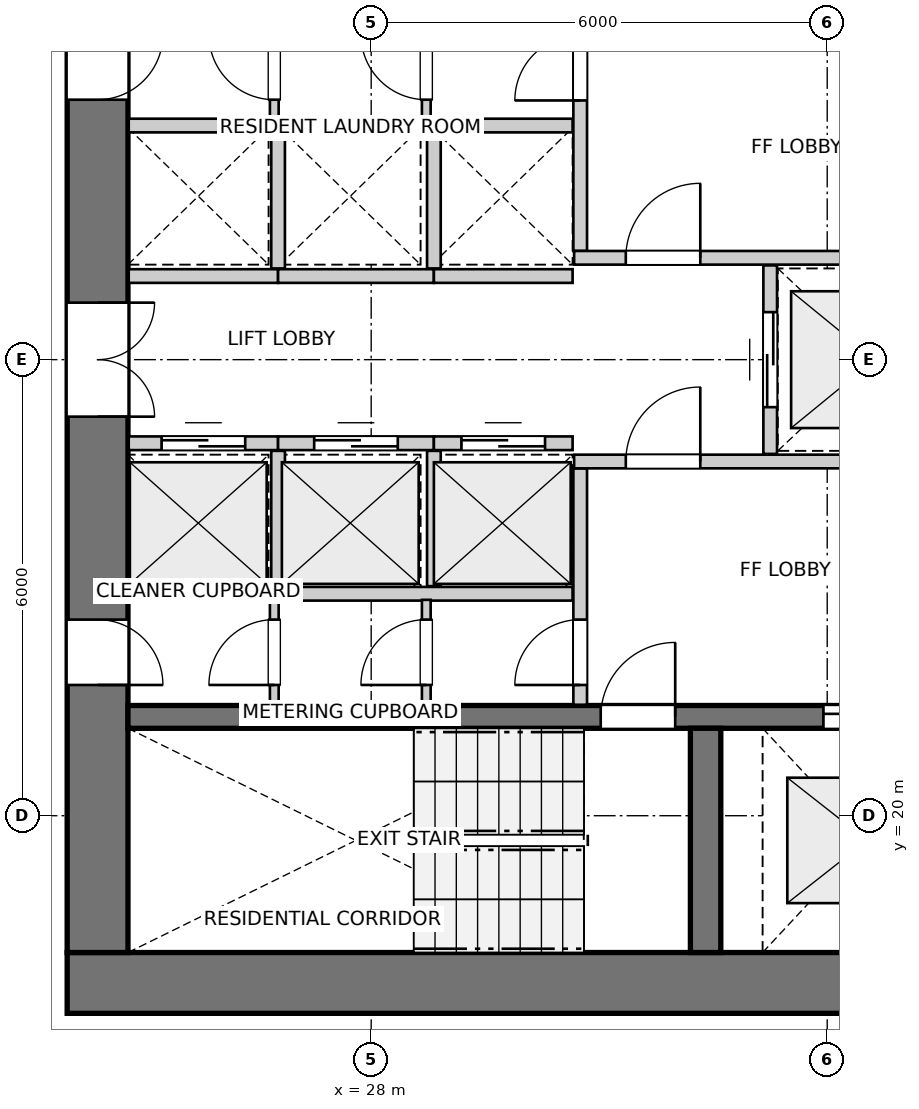
"""IFC4 building model, lengths in metres.
Left out: names, types, materials, properties, quantities, classifications, styles, units other than length and angle.
Written with IfcOpenShell. Run it as: python <this file> out.ifc"""

import sys

from ifc_helpers import new_model, si_unit, direction, frame, frame_2d, origin, place, context, subcontext, project, spatial, rectangle, extrude, source, transform, mapped, element, fill, save


model = new_model("IFC4")
c1 = context("Model", 3, precision=1e-05, world=origin(), true_north=direction((0.0, 1.0)))
c2 = subcontext(c1, "Body", "Model", "MODEL_VIEW")
j1 = project(units=[si_unit("LENGTHUNIT", "METRE"), si_unit("PLANEANGLEUNIT", "RADIAN")], contexts=[c1])
p1 = place(None, origin())
s1 = spatial("IfcSite", under=j1, at=p1, CompositionType="ELEMENT")
p2 = place(p1, origin())
s2 = spatial("IfcBuilding", under=s1, at=p2, CompositionType="ELEMENT")
p3 = place(p2, frame((0.0, 0.0, 55.8)))
s3 = spatial("IfcBuildingStorey", under=s2, at=p3, CompositionType="ELEMENT", Elevation=55.8)
p4 = place(p3, frame((24.0, 17.8, 0.0), z_axis=(0.0, 0.0, 1.0), x_axis=(1.0, 0.0, 0.0)))
e1 = element("IfcWall", 1, at=p4, inside=s3, PredefinedType="SHEAR", context=c2, shape_type="SweptSolid", body=[
    extrude(rectangle(XDim=12.7, YDim=0.8, at=frame_2d((6.35, 0.0))), origin(), (0.0, 0.0, 1.0), 2.94),
])
p5 = place(p3, frame((24.4, 33.8, 0.0), z_axis=(0.0, 0.0, 1.0), x_axis=(0.0, -1.0, 0.0)))
e2 = element("IfcWall", 2, at=p5, inside=s3, PredefinedType="SHEAR", context=c2, shape_type="SweptSolid", body=[
    extrude(rectangle(XDim=15.6, YDim=0.8, at=frame_2d((7.8, 0.0))), origin(), (0.0, 0.0, 1.0), 2.94),
])
p6 = place(p5, frame((7.05, 0.0, 0.0)))
e3 = element("IfcOpeningElement", 3, at=p6, cuts=e2, PredefinedType="OPENING", context=c2, shape_type="SweptSolid", body=[
    extrude(rectangle(XDim=1.5, YDim=2.15, at=frame_2d((0.75, 1.075))), frame((0.0, 0.41, 0.0), z_axis=(0.0, -1.0, 0.0), x_axis=(1.0, 0.0, 0.0)), (0.0, 0.0, 1.0), 0.82),
])
p7 = place(p5, frame((3.52, 0.0, 0.0)))
e4 = element("IfcOpeningElement", 4, at=p7, cuts=e2, PredefinedType="OPENING", context=c2, shape_type="SweptSolid", body=[
    extrude(rectangle(XDim=0.86, YDim=2.05, at=frame_2d((0.43, 1.025))), frame((0.0, 0.41, 0.0), z_axis=(0.0, -1.0, 0.0), x_axis=(1.0, 0.0, 0.0)), (0.0, 0.0, 1.0), 0.82),
])
p8 = place(p5, frame((11.22, 0.0, 0.0)))
e5 = element("IfcOpeningElement", 5, at=p8, cuts=e2, PredefinedType="OPENING", context=c2, shape_type="SweptSolid", body=[
    extrude(rectangle(XDim=0.86, YDim=2.05, at=frame_2d((0.43, 1.025))), frame((0.0, 0.41, 0.0), z_axis=(0.0, -1.0, 0.0), x_axis=(1.0, 0.0, 0.0)), (0.0, 0.0, 1.0), 0.82),
])
p9 = place(p3, frame((24.8, 21.3, 0.0), z_axis=(0.0, 0.0, 1.0), x_axis=(1.0, 0.0, 0.0)))
e6 = element("IfcWall", 6, at=p9, inside=s3, PredefinedType="SHEAR", context=c2, shape_type="SweptSolid", body=[
    extrude(rectangle(XDim=11.1, YDim=0.3, at=frame_2d((5.55, 0.0))), origin(), (0.0, 0.0, 1.0), 2.94),
])
p10 = place(p9, frame((6.22, 0.0, 0.0)))
e7 = element("IfcOpeningElement", 7, at=p10, cuts=e6, PredefinedType="OPENING", context=c2, shape_type="SweptSolid", body=[
    extrude(rectangle(XDim=0.98, YDim=2.15, at=frame_2d((0.49, 1.075))), frame((0.0, 0.16, 0.0), z_axis=(0.0, -1.0, 0.0), x_axis=(1.0, 0.0, 0.0)), (0.0, 0.0, 1.0), 0.32),
])
p11 = place(p9, frame((9.15, 0.0, 0.0)))
e8 = element("IfcOpeningElement", 8, at=p11, cuts=e6, PredefinedType="OPENING", context=c2, shape_type="SweptSolid", body=[
    extrude(rectangle(XDim=1.15, YDim=2.15, at=frame_2d((0.575, 1.075))), frame((0.0, 0.16, 0.0), z_axis=(0.0, -1.0, 0.0), x_axis=(1.0, 0.0, 0.0)), (0.0, 0.0, 1.0), 0.32),
])
p12 = place(p3, frame((32.4, 18.2, 0.0), z_axis=(0.0, 0.0, 1.0), x_axis=(0.0, 1.0, 0.0)))
e9 = element("IfcWall", 9, at=p12, inside=s3, PredefinedType="SHEAR", context=c2, shape_type="SweptSolid", body=[
    extrude(rectangle(XDim=2.95, YDim=0.4, at=frame_2d((1.475, 0.0))), origin(), (0.0, 0.0, 1.0), 2.94),
])
p13 = place(p3, frame((30.75, 21.46, 0.0), z_axis=(0.0, 0.0, 1.0), x_axis=(0.0, 1.0, 0.0)))
e10 = element("IfcWall", 10, at=p13, inside=s3, PredefinedType="PARTITIONING", context=c2, shape_type="SweptSolid", body=[
    extrude(rectangle(XDim=3.11, YDim=0.18, at=frame_2d((1.555, 0.0))), origin(), (0.0, 0.0, 1.0), 2.94),
])
p14 = place(p13, frame((0.26, 0.0, 0.0)))
e11 = element("IfcOpeningElement", 11, at=p14, cuts=e10, PredefinedType="OPENING", context=c2, shape_type="SweptSolid", body=[
    extrude(rectangle(XDim=0.86, YDim=2.05, at=frame_2d((0.43, 1.025))), frame((0.0, 0.1, 0.0), z_axis=(0.0, -1.0, 0.0), x_axis=(1.0, 0.0, 0.0)), (0.0, 0.0, 1.0), 0.2),
])
p15 = place(p3, frame((30.67, 24.66, 0.0), z_axis=(0.0, 0.0, 1.0), x_axis=(1.0, 0.0, 0.0)))
e12 = element("IfcWall", 12, at=p15, inside=s3, PredefinedType="PARTITIONING", context=c2, shape_type="SweptSolid", body=[
    extrude(rectangle(XDim=5.22, YDim=0.18, at=frame_2d((2.61, 0.0))), origin(), (0.0, 0.0, 1.0), 2.94),
])
p16 = place(p15, frame((0.68, 0.0, 0.0)))
e13 = element("IfcOpeningElement", 13, at=p16, cuts=e12, PredefinedType="OPENING", context=c2, shape_type="SweptSolid", body=[
    extrude(rectangle(XDim=0.98, YDim=2.15, at=frame_2d((0.49, 1.075))), frame((0.0, 0.1, 0.0), z_axis=(0.0, -1.0, 0.0), x_axis=(1.0, 0.0, 0.0)), (0.0, 0.0, 1.0), 0.2),
])
p17 = place(p3, frame((30.75, 27.43, 0.0), z_axis=(0.0, 0.0, 1.0), x_axis=(0.0, 1.0, 0.0)))
e14 = element("IfcWall", 14, at=p17, inside=s3, PredefinedType="PARTITIONING", context=c2, shape_type="SweptSolid", body=[
    extrude(rectangle(XDim=3.11, YDim=0.18, at=frame_2d((1.555, 0.0))), origin(), (0.0, 0.0, 1.0), 2.94),
])
p18 = place(p17, frame((1.98, 0.0, 0.0)))
e15 = element("IfcOpeningElement", 15, at=p18, cuts=e14, PredefinedType="OPENING", context=c2, shape_type="SweptSolid", body=[
    extrude(rectangle(XDim=0.86, YDim=2.05, at=frame_2d((0.43, 1.025))), frame((0.0, 0.1, 0.0), z_axis=(0.0, -1.0, 0.0), x_axis=(1.0, 0.0, 0.0)), (0.0, 0.0, 1.0), 0.2),
])
p19 = place(p3, frame((30.67, 27.34, 0.0), z_axis=(0.0, 0.0, 1.0), x_axis=(1.0, 0.0, 0.0)))
e16 = element("IfcWall", 16, at=p19, inside=s3, PredefinedType="PARTITIONING", context=c2, shape_type="SweptSolid", body=[
    extrude(rectangle(XDim=5.22, YDim=0.18, at=frame_2d((2.61, 0.0))), origin(), (0.0, 0.0, 1.0), 2.94),
])
p20 = place(p19, frame((0.68, 0.0, 0.0)))
e17 = element("IfcOpeningElement", 17, at=p20, cuts=e16, PredefinedType="OPENING", context=c2, shape_type="SweptSolid", body=[
    extrude(rectangle(XDim=0.98, YDim=2.15, at=frame_2d((0.49, 1.075))), frame((0.0, 0.1, 0.0), z_axis=(0.0, -1.0, 0.0), x_axis=(1.0, 0.0, 0.0)), (0.0, 0.0, 1.0), 0.2),
])
p21 = place(p3, frame((33.25, 24.76, 0.0), z_axis=(0.0, 0.0, 1.0), x_axis=(0.0, 1.0, 0.0)))
e18 = element("IfcWall", 18, at=p21, inside=s3, PredefinedType="PARTITIONING", context=c2, shape_type="SweptSolid", body=[
    extrude(rectangle(XDim=2.48, YDim=0.18, at=frame_2d((1.24, 0.0))), origin(), (0.0, 0.0, 1.0), 2.94),
])
p22 = place(p21, frame((0.615, 0.0, 0.0)))
e19 = element("IfcOpeningElement", 19, at=p22, cuts=e18, PredefinedType="OPENING", context=c2, shape_type="SweptSolid", body=[
    extrude(rectangle(XDim=1.25, YDim=2.15, at=frame_2d((0.625, 1.075))), frame((0.0, 0.1, 0.0), z_axis=(0.0, -1.0, 0.0), x_axis=(1.0, 0.0, 0.0)), (0.0, 0.0, 1.0), 0.2),
])
p23 = place(p3, frame((24.81, 22.92, 0.0), z_axis=(0.0, 0.0, 1.0), x_axis=(1.0, 0.0, 0.0)))
e20 = element("IfcWall", 20, at=p23, inside=s3, PredefinedType="PARTITIONING", context=c2, shape_type="SweptSolid", body=[
    extrude(rectangle(XDim=5.84, YDim=0.18, at=frame_2d((2.92, 0.0))), origin(), (0.0, 0.0, 1.0), 2.94),
])
p24 = place(p3, frame((24.81, 24.9, 0.0), z_axis=(0.0, 0.0, 1.0), x_axis=(1.0, 0.0, 0.0)))
e21 = element("IfcWall", 21, at=p24, inside=s3, PredefinedType="PARTITIONING", context=c2, shape_type="SweptSolid", body=[
    extrude(rectangle(XDim=1.965, YDim=0.18, at=frame_2d((0.982, 0.0))), origin(), (0.0, 0.0, 1.0), 2.94),
])
p25 = place(p24, frame((0.433, 0.0, 0.0)))
e22 = element("IfcOpeningElement", 22, at=p25, cuts=e21, PredefinedType="OPENING", context=c2, shape_type="SweptSolid", body=[
    extrude(rectangle(XDim=1.1, YDim=2.15, at=frame_2d((0.55, 1.075))), frame((0.0, 0.1, 0.0), z_axis=(0.0, -1.0, 0.0), x_axis=(1.0, 0.0, 0.0)), (0.0, 0.0, 1.0), 0.2),
])
p26 = place(p3, frame((26.775, 24.9, 0.0), z_axis=(0.0, 0.0, 1.0), x_axis=(1.0, 0.0, 0.0)))
e23 = element("IfcWall", 23, at=p26, inside=s3, PredefinedType="PARTITIONING", context=c2, shape_type="SweptSolid", body=[
    extrude(rectangle(XDim=2.05, YDim=0.18, at=frame_2d((1.025, 0.0))), origin(), (0.0, 0.0, 1.0), 2.94),
])
p27 = place(p26, frame((0.475, 0.0, 0.0)))
e24 = element("IfcOpeningElement", 24, at=p27, cuts=e23, PredefinedType="OPENING", context=c2, shape_type="SweptSolid", body=[
    extrude(rectangle(XDim=1.1, YDim=2.15, at=frame_2d((0.55, 1.075))), frame((0.0, 0.1, 0.0), z_axis=(0.0, -1.0, 0.0), x_axis=(1.0, 0.0, 0.0)), (0.0, 0.0, 1.0), 0.2),
])
p28 = place(p3, frame((26.775, 23.02, 0.0), z_axis=(0.0, 0.0, 1.0), x_axis=(0.0, 1.0, 0.0)))
e25 = element("IfcWall", 25, at=p28, inside=s3, PredefinedType="PARTITIONING", context=c2, shape_type="SweptSolid", body=[
    extrude(rectangle(XDim=1.78, YDim=0.18, at=frame_2d((0.89, 0.0))), origin(), (0.0, 0.0, 1.0), 2.94),
])
p29 = place(p3, frame((28.825, 24.9, 0.0), z_axis=(0.0, 0.0, 1.0), x_axis=(1.0, 0.0, 0.0)))
e26 = element("IfcWall", 26, at=p29, inside=s3, PredefinedType="PARTITIONING", context=c2, shape_type="SweptSolid", body=[
    extrude(rectangle(XDim=1.825, YDim=0.18, at=frame_2d((0.913, 0.0))), origin(), (0.0, 0.0, 1.0), 2.94),
])
p30 = place(p29, frame((0.363, 0.0, 0.0)))
e27 = element("IfcOpeningElement", 27, at=p30, cuts=e26, PredefinedType="OPENING", context=c2, shape_type="SweptSolid", body=[
    extrude(rectangle(XDim=1.1, YDim=2.15, at=frame_2d((0.55, 1.075))), frame((0.0, 0.1, 0.0), z_axis=(0.0, -1.0, 0.0), x_axis=(1.0, 0.0, 0.0)), (0.0, 0.0, 1.0), 0.2),
])
p31 = place(p3, frame((28.825, 23.02, 0.0), z_axis=(0.0, 0.0, 1.0), x_axis=(0.0, 1.0, 0.0)))
e28 = element("IfcWall", 28, at=p31, inside=s3, PredefinedType="PARTITIONING", context=c2, shape_type="SweptSolid", body=[
    extrude(rectangle(XDim=1.78, YDim=0.18, at=frame_2d((0.89, 0.0))), origin(), (0.0, 0.0, 1.0), 2.94),
])
p32 = place(p3, frame((24.81, 29.08, 0.0), z_axis=(0.0, 0.0, 1.0), x_axis=(1.0, 0.0, 0.0)))
e29 = element("IfcWall", 29, at=p32, inside=s3, PredefinedType="PARTITIONING", context=c2, shape_type="SweptSolid", body=[
    extrude(rectangle(XDim=5.84, YDim=0.18, at=frame_2d((2.92, 0.0))), origin(), (0.0, 0.0, 1.0), 2.94),
])
p33 = place(p3, frame((24.81, 27.1, 0.0), z_axis=(0.0, 0.0, 1.0), x_axis=(1.0, 0.0, 0.0)))
e30 = element("IfcWall", 30, at=p33, inside=s3, PredefinedType="PARTITIONING", context=c2, shape_type="SweptSolid", body=[
    extrude(rectangle(XDim=1.965, YDim=0.18, at=frame_2d((0.982, 0.0))), origin(), (0.0, 0.0, 1.0), 2.94),
])
p34 = place(p3, frame((26.775, 27.1, 0.0), z_axis=(0.0, 0.0, 1.0), x_axis=(1.0, 0.0, 0.0)))
e31 = element("IfcWall", 31, at=p34, inside=s3, PredefinedType="PARTITIONING", context=c2, shape_type="SweptSolid", body=[
    extrude(rectangle(XDim=2.05, YDim=0.18, at=frame_2d((1.025, 0.0))), origin(), (0.0, 0.0, 1.0), 2.94),
])
p35 = place(p3, frame((26.775, 27.2, 0.0), z_axis=(0.0, 0.0, 1.0), x_axis=(0.0, 1.0, 0.0)))
e32 = element("IfcWall", 32, at=p35, inside=s3, PredefinedType="PARTITIONING", context=c2, shape_type="SweptSolid", body=[
    extrude(rectangle(XDim=1.78, YDim=0.18, at=frame_2d((0.89, 0.0))), origin(), (0.0, 0.0, 1.0), 2.94),
])
p36 = place(p3, frame((28.825, 27.1, 0.0), z_axis=(0.0, 0.0, 1.0), x_axis=(1.0, 0.0, 0.0)))
e33 = element("IfcWall", 33, at=p36, inside=s3, PredefinedType="PARTITIONING", context=c2, shape_type="SweptSolid", body=[
    extrude(rectangle(XDim=1.825, YDim=0.18, at=frame_2d((0.913, 0.0))), origin(), (0.0, 0.0, 1.0), 2.94),
])
p37 = place(p3, frame((28.825, 27.2, 0.0), z_axis=(0.0, 0.0, 1.0), x_axis=(0.0, 1.0, 0.0)))
e34 = element("IfcWall", 34, at=p37, inside=s3, PredefinedType="PARTITIONING", context=c2, shape_type="SweptSolid", body=[
    extrude(rectangle(XDim=1.78, YDim=0.18, at=frame_2d((0.89, 0.0))), origin(), (0.0, 0.0, 1.0), 2.94),
])
p38 = place(p3, frame((26.725, 21.46, 0.0), z_axis=(0.0, 0.0, 1.0), x_axis=(0.0, 1.0, 0.0)))
e35 = element("IfcWall", 35, at=p38, inside=s3, PredefinedType="PARTITIONING", context=c2, shape_type="SweptSolid", body=[
    extrude(rectangle(XDim=1.38, YDim=0.115, at=frame_2d((0.69, 0.0))), origin(), (0.0, 0.0, 1.0), 2.94),
])
p39 = place(p38, frame((0.26, 0.0, 0.0)))
e36 = element("IfcOpeningElement", 36, at=p39, cuts=e35, PredefinedType="OPENING", context=c2, shape_type="SweptSolid", body=[
    extrude(rectangle(XDim=0.86, YDim=2.05, at=frame_2d((0.43, 1.025))), frame((0.0, 0.067, 0.0), z_axis=(0.0, -1.0, 0.0), x_axis=(1.0, 0.0, 0.0)), (0.0, 0.0, 1.0), 0.135),
])
p40 = place(p3, frame((26.725, 29.16, 0.0), z_axis=(0.0, 0.0, 1.0), x_axis=(0.0, 1.0, 0.0)))
e37 = element("IfcWall", 37, at=p40, inside=s3, PredefinedType="PARTITIONING", context=c2, shape_type="SweptSolid", body=[
    extrude(rectangle(XDim=1.38, YDim=0.115, at=frame_2d((0.69, 0.0))), origin(), (0.0, 0.0, 1.0), 2.94),
])
p41 = place(p40, frame((0.26, 0.0, 0.0)))
e38 = element("IfcOpeningElement", 38, at=p41, cuts=e37, PredefinedType="OPENING", context=c2, shape_type="SweptSolid", body=[
    extrude(rectangle(XDim=0.86, YDim=2.05, at=frame_2d((0.43, 1.025))), frame((0.0, 0.067, 0.0), z_axis=(0.0, -1.0, 0.0), x_axis=(1.0, 0.0, 0.0)), (0.0, 0.0, 1.0), 0.135),
])
p42 = place(p3, frame((28.725, 21.46, 0.0), z_axis=(0.0, 0.0, 1.0), x_axis=(0.0, 1.0, 0.0)))
e39 = element("IfcWall", 39, at=p42, inside=s3, PredefinedType="PARTITIONING", context=c2, shape_type="SweptSolid", body=[
    extrude(rectangle(XDim=1.38, YDim=0.115, at=frame_2d((0.69, 0.0))), origin(), (0.0, 0.0, 1.0), 2.94),
])
p43 = place(p42, frame((0.26, 0.0, 0.0)))
e40 = element("IfcOpeningElement", 40, at=p43, cuts=e39, PredefinedType="OPENING", context=c2, shape_type="SweptSolid", body=[
    extrude(rectangle(XDim=0.86, YDim=2.05, at=frame_2d((0.43, 1.025))), frame((0.0, 0.067, 0.0), z_axis=(0.0, -1.0, 0.0), x_axis=(1.0, 0.0, 0.0)), (0.0, 0.0, 1.0), 0.135),
])
p44 = place(p3, frame((28.725, 29.16, 0.0), z_axis=(0.0, 0.0, 1.0), x_axis=(0.0, 1.0, 0.0)))
e41 = element("IfcWall", 41, at=p44, inside=s3, PredefinedType="PARTITIONING", context=c2, shape_type="SweptSolid", body=[
    extrude(rectangle(XDim=1.38, YDim=0.115, at=frame_2d((0.69, 0.0))), origin(), (0.0, 0.0, 1.0), 2.94),
])
p45 = place(p44, frame((0.26, 0.0, 0.0)))
e42 = element("IfcOpeningElement", 42, at=p45, cuts=e41, PredefinedType="OPENING", context=c2, shape_type="SweptSolid", body=[
    extrude(rectangle(XDim=0.86, YDim=2.05, at=frame_2d((0.43, 1.025))), frame((0.0, 0.067, 0.0), z_axis=(0.0, -1.0, 0.0), x_axis=(1.0, 0.0, 0.0)), (0.0, 0.0, 1.0), 0.135),
])
m1 = source(origin(), c2, "Body", "SweptSolid", [
    extrude(rectangle(XDim=0.98, YDim=2.15, at=frame_2d((0.49, 1.075))), frame((0.0, 0.025, 0.0), z_axis=(0.0, -1.0, 0.0), x_axis=(1.0, 0.0, 0.0)), (0.0, 0.0, 1.0), 0.05),
])
p46 = place(p10, origin())
e43 = element("IfcDoor", 43, at=p46, inside=s3, OperationType="SINGLE_SWING_RIGHT", PredefinedType="DOOR", context=c2, shape_type="MappedRepresentation", body=[
    mapped(m1, transform((0.0, 0.0, 0.0), x_axis=(1.0, 0.0, 0.0), y_axis=(0.0, 1.0, 0.0), z_axis=(0.0, 0.0, 1.0), scale=1.0)),
])
fill(e7, e43)
m2 = source(origin(), c2, "Body", "SweptSolid", [
    extrude(rectangle(XDim=1.15, YDim=2.15, at=frame_2d((0.575, 1.075))), frame((0.0, 0.025, 0.0), z_axis=(0.0, -1.0, 0.0), x_axis=(1.0, 0.0, 0.0)), (0.0, 0.0, 1.0), 0.05),
])
p47 = place(p11, origin())
e44 = element("IfcDoor", 44, at=p47, inside=s3, OperationType="DOUBLE_DOOR_SLIDING", PredefinedType="DOOR", context=c2, shape_type="MappedRepresentation", body=[
    mapped(m2, transform((0.0, 0.0, 0.0), x_axis=(1.0, 0.0, 0.0), y_axis=(0.0, 1.0, 0.0), z_axis=(0.0, 0.0, 1.0), scale=1.0)),
])
fill(e8, e44)
m3 = source(origin(), c2, "Body", "SweptSolid", [
    extrude(rectangle(XDim=1.5, YDim=2.15, at=frame_2d((0.75, 1.075))), frame((0.0, 0.025, 0.0), z_axis=(0.0, -1.0, 0.0), x_axis=(1.0, 0.0, 0.0)), (0.0, 0.0, 1.0), 0.05),
])
p48 = place(p6, origin())
e45 = element("IfcDoor", 45, at=p48, inside=s3, OperationType="DOUBLE_DOOR_SINGLE_SWING", PredefinedType="DOOR", context=c2, shape_type="MappedRepresentation", body=[
    mapped(m3, transform((0.0, 0.0, 0.0), x_axis=(1.0, 0.0, 0.0), y_axis=(0.0, 1.0, 0.0), z_axis=(0.0, 0.0, 1.0), scale=1.0)),
])
fill(e3, e45)
m4 = source(origin(), c2, "Body", "SweptSolid", [
    extrude(rectangle(XDim=0.86, YDim=2.05, at=frame_2d((0.43, 1.025))), frame((0.0, 0.025, 0.0), z_axis=(0.0, -1.0, 0.0), x_axis=(1.0, 0.0, 0.0)), (0.0, 0.0, 1.0), 0.05),
])
p49 = place(p7, origin())
e46 = element("IfcDoor", 46, at=p49, inside=s3, OperationType="SINGLE_SWING_LEFT", PredefinedType="DOOR", context=c2, shape_type="MappedRepresentation", body=[
    mapped(m4, transform((0.0, 0.0, 0.0), x_axis=(1.0, 0.0, 0.0), y_axis=(0.0, 1.0, 0.0), z_axis=(0.0, 0.0, 1.0), scale=1.0)),
])
fill(e4, e46)
p50 = place(p8, origin())
e47 = element("IfcDoor", 47, at=p50, inside=s3, OperationType="SINGLE_SWING_RIGHT", PredefinedType="DOOR", context=c2, shape_type="MappedRepresentation", body=[
    mapped(m4, transform((0.0, 0.0, 0.0), x_axis=(1.0, 0.0, 0.0), y_axis=(0.0, 1.0, 0.0), z_axis=(0.0, 0.0, 1.0), scale=1.0)),
])
fill(e5, e47)
p51 = place(p14, origin())
e48 = element("IfcDoor", 48, at=p51, inside=s3, OperationType="SINGLE_SWING_LEFT", PredefinedType="DOOR", context=c2, shape_type="MappedRepresentation", body=[
    mapped(m4, transform((0.0, 0.0, 0.0), x_axis=(1.0, 0.0, 0.0), y_axis=(0.0, 1.0, 0.0), z_axis=(0.0, 0.0, 1.0), scale=1.0)),
])
fill(e11, e48)
p52 = place(p16, origin())
e49 = element("IfcDoor", 49, at=p52, inside=s3, OperationType="SINGLE_SWING_RIGHT", PredefinedType="DOOR", context=c2, shape_type="MappedRepresentation", body=[
    mapped(m1, transform((0.0, 0.0, 0.0), x_axis=(1.0, 0.0, 0.0), y_axis=(0.0, 1.0, 0.0), z_axis=(0.0, 0.0, 1.0), scale=1.0)),
])
fill(e13, e49)
p53 = place(p18, origin())
e50 = element("IfcDoor", 50, at=p53, inside=s3, OperationType="SINGLE_SWING_LEFT", PredefinedType="DOOR", context=c2, shape_type="MappedRepresentation", body=[
    mapped(m4, transform((0.0, 0.0, 0.0), x_axis=(1.0, 0.0, 0.0), y_axis=(0.0, 1.0, 0.0), z_axis=(0.0, 0.0, 1.0), scale=1.0)),
])
fill(e15, e50)
p54 = place(p20, origin())
e51 = element("IfcDoor", 51, at=p54, inside=s3, OperationType="SINGLE_SWING_RIGHT", PredefinedType="DOOR", context=c2, shape_type="MappedRepresentation", body=[
    mapped(m1, transform((0.0, 0.0, 0.0), x_axis=(1.0, 0.0, 0.0), y_axis=(0.0, 1.0, 0.0), z_axis=(0.0, 0.0, 1.0), scale=1.0)),
])
fill(e17, e51)
m5 = source(origin(), c2, "Body", "SweptSolid", [
    extrude(rectangle(XDim=1.25, YDim=2.15, at=frame_2d((0.625, 1.075))), frame((0.0, 0.025, 0.0), z_axis=(0.0, -1.0, 0.0), x_axis=(1.0, 0.0, 0.0)), (0.0, 0.0, 1.0), 0.05),
])
p55 = place(p22, origin())
e52 = element("IfcDoor", 52, at=p55, inside=s3, OperationType="DOUBLE_DOOR_SLIDING", PredefinedType="DOOR", context=c2, shape_type="MappedRepresentation", body=[
    mapped(m5, transform((0.0, 0.0, 0.0), x_axis=(1.0, 0.0, 0.0), y_axis=(0.0, 1.0, 0.0), z_axis=(0.0, 0.0, 1.0), scale=1.0)),
])
fill(e19, e52)
m6 = source(origin(), c2, "Body", "SweptSolid", [
    extrude(rectangle(XDim=1.1, YDim=2.15, at=frame_2d((0.55, 1.075))), frame((0.0, 0.025, 0.0), z_axis=(0.0, -1.0, 0.0), x_axis=(1.0, 0.0, 0.0)), (0.0, 0.0, 1.0), 0.05),
])
p56 = place(p25, origin())
e53 = element("IfcDoor", 53, at=p56, inside=s3, OperationType="DOUBLE_DOOR_SLIDING", PredefinedType="DOOR", context=c2, shape_type="MappedRepresentation", body=[
    mapped(m6, transform((0.0, 0.0, 0.0), x_axis=(1.0, 0.0, 0.0), y_axis=(0.0, 1.0, 0.0), z_axis=(0.0, 0.0, 1.0), scale=1.0)),
])
fill(e22, e53)
p57 = place(p27, origin())
e54 = element("IfcDoor", 54, at=p57, inside=s3, OperationType="DOUBLE_DOOR_SLIDING", PredefinedType="DOOR", context=c2, shape_type="MappedRepresentation", body=[
    mapped(m6, transform((0.0, 0.0, 0.0), x_axis=(1.0, 0.0, 0.0), y_axis=(0.0, 1.0, 0.0), z_axis=(0.0, 0.0, 1.0), scale=1.0)),
])
fill(e24, e54)
p58 = place(p30, origin())
e55 = element("IfcDoor", 55, at=p58, inside=s3, OperationType="DOUBLE_DOOR_SLIDING", PredefinedType="DOOR", context=c2, shape_type="MappedRepresentation", body=[
    mapped(m6, transform((0.0, 0.0, 0.0), x_axis=(1.0, 0.0, 0.0), y_axis=(0.0, 1.0, 0.0), z_axis=(0.0, 0.0, 1.0), scale=1.0)),
])
fill(e27, e55)
p59 = place(p39, origin())
e56 = element("IfcDoor", 56, at=p59, inside=s3, OperationType="SINGLE_SWING_LEFT", PredefinedType="DOOR", context=c2, shape_type="MappedRepresentation", body=[
    mapped(m4, transform((0.0, 0.0, 0.0), x_axis=(1.0, 0.0, 0.0), y_axis=(0.0, 1.0, 0.0), z_axis=(0.0, 0.0, 1.0), scale=1.0)),
])
fill(e36, e56)
p60 = place(p41, origin())
e57 = element("IfcDoor", 57, at=p60, inside=s3, OperationType="SINGLE_SWING_RIGHT", PredefinedType="DOOR", context=c2, shape_type="MappedRepresentation", body=[
    mapped(m4, transform((0.0, 0.0, 0.0), x_axis=(1.0, 0.0, 0.0), y_axis=(0.0, 1.0, 0.0), z_axis=(0.0, 0.0, 1.0), scale=1.0)),
])
fill(e38, e57)
p61 = place(p43, origin())
e58 = element("IfcDoor", 58, at=p61, inside=s3, OperationType="SINGLE_SWING_LEFT", PredefinedType="DOOR", context=c2, shape_type="MappedRepresentation", body=[
    mapped(m4, transform((0.0, 0.0, 0.0), x_axis=(1.0, 0.0, 0.0), y_axis=(0.0, 1.0, 0.0), z_axis=(0.0, 0.0, 1.0), scale=1.0)),
])
fill(e40, e58)
p62 = place(p45, origin())
e59 = element("IfcDoor", 59, at=p62, inside=s3, OperationType="SINGLE_SWING_RIGHT", PredefinedType="DOOR", context=c2, shape_type="MappedRepresentation", body=[
    mapped(m4, transform((0.0, 0.0, 0.0), x_axis=(1.0, 0.0, 0.0), y_axis=(0.0, 1.0, 0.0), z_axis=(0.0, 0.0, 1.0), scale=1.0)),
])
fill(e42, e59)
save(model, sys.argv[1])
